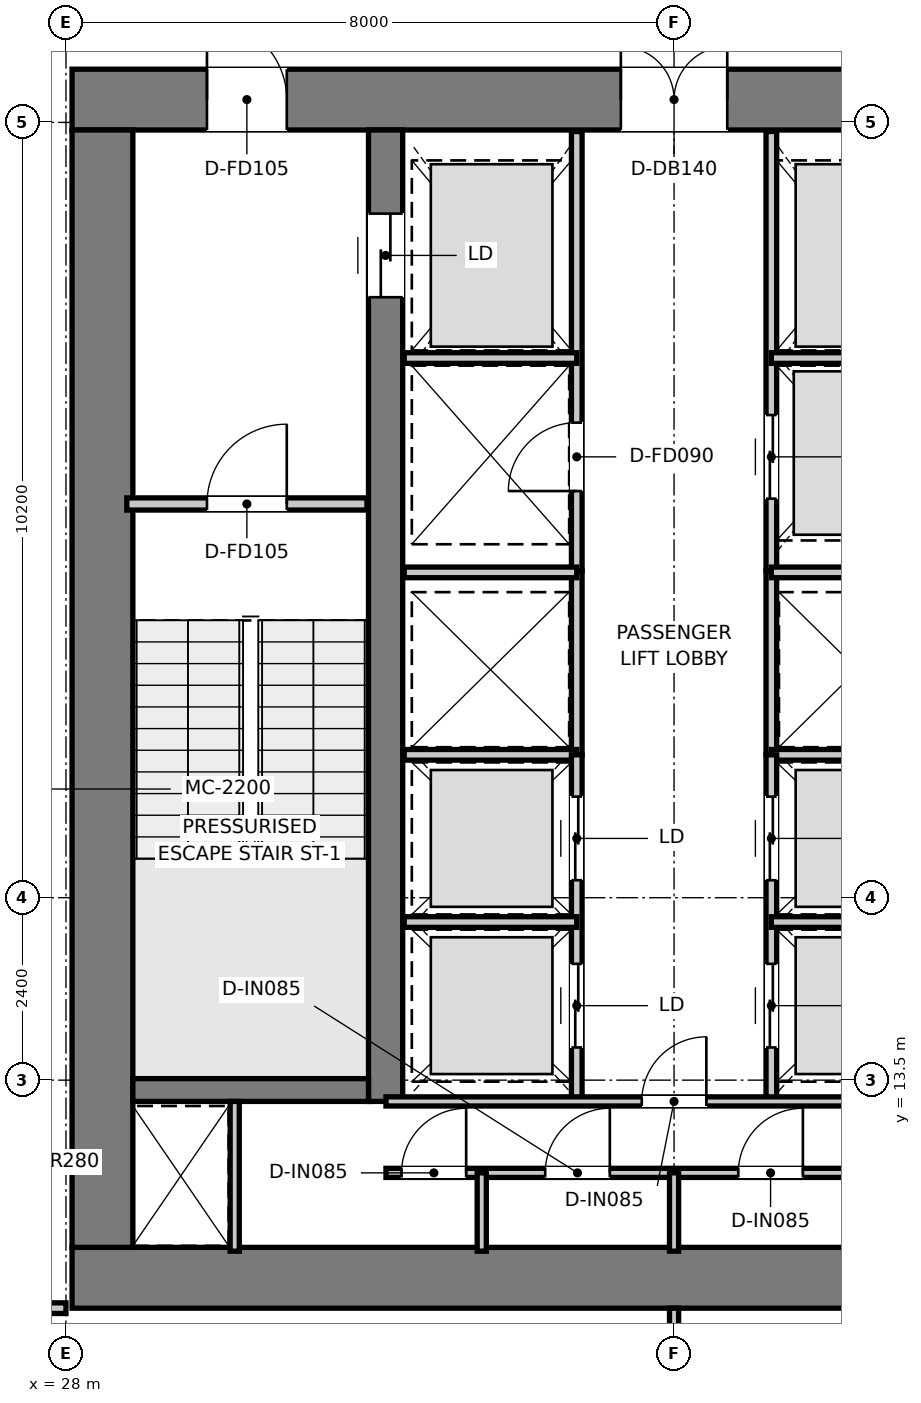
"""IFC4 building model, lengths in metres.
Left out: names, types, materials, properties, quantities, classifications, styles, units other than length and angle.
Written with IfcOpenShell. Run it as: python <this file> out.ifc"""

import sys

from ifc_helpers import new_model, si_unit, direction, frame, frame_2d, origin, place, context, subcontext, project, spatial, rectangle, extrude, element, fill, save


model = new_model("IFC4")
c1 = context("Model", 3, precision=1e-05, world=origin(), true_north=direction((0.0, 1.0)))
c2 = subcontext(c1, "Body", "Model", "MODEL_VIEW")
j1 = project(units=[si_unit("LENGTHUNIT", "METRE"), si_unit("PLANEANGLEUNIT", "RADIAN")], contexts=[c1])
p1 = place(None, origin())
s1 = spatial("IfcSite", under=j1, at=p1, CompositionType="ELEMENT")
p2 = place(p1, origin())
s2 = spatial("IfcBuilding", under=s1, at=p2, CompositionType="ELEMENT")
p3 = place(p2, frame((0.0, 0.0, 28.95)))
s3 = spatial("IfcBuildingStorey", under=s2, at=p3, CompositionType="ELEMENT", Elevation=28.95)
p4 = place(p3, frame((28.08, 10.9, 0.0), z_axis=(0.0, 0.0, 1.0), x_axis=(1.0, 0.0, 0.0)))
e1 = element("IfcWall", 1, at=p4, inside=s3, PredefinedType="SHEAR", context=c2, shape_type="SweptSolid", body=[
    extrude(rectangle(XDim=15.84, YDim=0.8, at=frame_2d((7.92, 0.0))), origin(), (0.0, 0.0, 1.0), 3.95),
])
p5 = place(p3, frame((28.08, 26.4, 0.0), z_axis=(0.0, 0.0, 1.0), x_axis=(1.0, 0.0, 0.0)))
e2 = element("IfcWall", 2, at=p5, inside=s3, PredefinedType="SHEAR", context=c2, shape_type="SweptSolid", body=[
    extrude(rectangle(XDim=15.84, YDim=0.8, at=frame_2d((7.92, 0.0))), origin(), (0.0, 0.0, 1.0), 3.95),
])
p6 = place(p5, frame((7.22, 0.0, 0.0)))
e3 = element("IfcOpeningElement", 3, at=p6, cuts=e2, PredefinedType="OPENING", context=c2, shape_type="SweptSolid", body=[
    extrude(rectangle(XDim=1.4, YDim=2.2, at=frame_2d((0.7, 1.1))), frame((0.0, 0.41, 0.0), z_axis=(0.0, -1.0, 0.0), x_axis=(1.0, 0.0, 0.0)), (0.0, 0.0, 1.0), 0.82),
])
p7 = place(p5, frame((1.775, 0.0, 0.0)))
e4 = element("IfcOpeningElement", 4, at=p7, cuts=e2, PredefinedType="OPENING", context=c2, shape_type="SweptSolid", body=[
    extrude(rectangle(XDim=1.05, YDim=2.1, at=frame_2d((0.525, 1.05))), frame((0.0, 0.41, 0.0), z_axis=(0.0, -1.0, 0.0), x_axis=(1.0, 0.0, 0.0)), (0.0, 0.0, 1.0), 0.82),
])
p8 = place(p5, frame((13.015, 0.0, 0.0)))
e5 = element("IfcOpeningElement", 5, at=p8, cuts=e2, PredefinedType="OPENING", context=c2, shape_type="SweptSolid", body=[
    extrude(rectangle(XDim=1.05, YDim=2.1, at=frame_2d((0.525, 1.05))), frame((0.0, 0.41, 0.0), z_axis=(0.0, -1.0, 0.0), x_axis=(1.0, 0.0, 0.0)), (0.0, 0.0, 1.0), 0.82),
])
p9 = place(p3, frame((28.48, 11.3, 0.0), z_axis=(0.0, 0.0, 1.0), x_axis=(0.0, 1.0, 0.0)))
e6 = element("IfcWall", 6, at=p9, inside=s3, PredefinedType="SHEAR", context=c2, shape_type="SweptSolid", body=[
    extrude(rectangle(XDim=14.7, YDim=0.8, at=frame_2d((7.35, 0.0))), origin(), (0.0, 0.0, 1.0), 3.95),
])
p10 = place(p3, frame((32.205, 13.22, 0.0), z_axis=(0.0, 0.0, 1.0), x_axis=(0.0, 1.0, 0.0)))
e7 = element("IfcWall", 7, at=p10, inside=s3, PredefinedType="SHEAR", context=c2, shape_type="SweptSolid", body=[
    extrude(rectangle(XDim=12.78, YDim=0.45, at=frame_2d((6.39, 0.0))), origin(), (0.0, 0.0, 1.0), 3.95),
])
p11 = place(p10, frame((10.58, 0.0, 0.0)))
e8 = element("IfcOpeningElement", 8, at=p11, cuts=e7, PredefinedType="OPENING", context=c2, shape_type="SweptSolid", body=[
    extrude(rectangle(XDim=1.1, YDim=2.15, at=frame_2d((0.55, 1.075))), frame((0.0, 0.235, 0.0), z_axis=(0.0, -1.0, 0.0), x_axis=(1.0, 0.0, 0.0)), (0.0, 0.0, 1.0), 0.47),
])
p12 = place(p3, frame((28.88, 13.37, 0.0), z_axis=(0.0, 0.0, 1.0), x_axis=(1.0, 0.0, 0.0)))
e9 = element("IfcWall", 9, at=p12, inside=s3, PredefinedType="SHEAR", context=c2, shape_type="SweptSolid", body=[
    extrude(rectangle(XDim=3.1, YDim=0.3, at=frame_2d((1.55, 0.0))), origin(), (0.0, 0.0, 1.0), 3.95),
])
p13 = place(p3, frame((28.8, 21.08, 0.0), z_axis=(0.0, 0.0, 1.0), x_axis=(1.0, 0.0, 0.0)))
e10 = element("IfcWall", 10, at=p13, inside=s3, PredefinedType="PARTITIONING", context=c2, shape_type="SweptSolid", body=[
    extrude(rectangle(XDim=3.16, YDim=0.16, at=frame_2d((1.58, 0.0))), origin(), (0.0, 0.0, 1.0), 3.67),
])
p14 = place(p13, frame((1.055, 0.0, 0.0)))
e11 = element("IfcOpeningElement", 11, at=p14, cuts=e10, PredefinedType="OPENING", context=c2, shape_type="SweptSolid", body=[
    extrude(rectangle(XDim=1.05, YDim=2.1, at=frame_2d((0.525, 1.05))), frame((0.0, 0.09, 0.0), z_axis=(0.0, -1.0, 0.0), x_axis=(1.0, 0.0, 0.0)), (0.0, 0.0, 1.0), 0.18),
])
p15 = place(p3, frame((34.72, 20.2, 0.0), z_axis=(0.0, 0.0, 1.0), x_axis=(0.0, 1.0, 0.0)))
e12 = element("IfcWall", 12, at=p15, inside=s3, PredefinedType="PARTITIONING", context=c2, shape_type="SweptSolid", body=[
    extrude(rectangle(XDim=5.78, YDim=0.14, at=frame_2d((2.89, 0.0))), origin(), (0.0, 0.0, 1.0), 2.47),
])
p16 = place(p15, frame((1.05, 0.0, 0.0)))
e13 = element("IfcOpeningElement", 13, at=p16, cuts=e12, PredefinedType="OPENING", context=c2, shape_type="SweptSolid", body=[
    extrude(rectangle(XDim=0.9, YDim=2.1, at=frame_2d((0.45, 1.05))), frame((0.0, 0.08, 0.0), z_axis=(0.0, -1.0, 0.0), x_axis=(1.0, 0.0, 0.0)), (0.0, 0.0, 1.0), 0.16),
])
p17 = place(p3, frame((37.28, 20.2, 0.0), z_axis=(0.0, 0.0, 1.0), x_axis=(0.0, 1.0, 0.0)))
e14 = element("IfcWall", 14, at=p17, inside=s3, PredefinedType="PARTITIONING", context=c2, shape_type="SweptSolid", body=[
    extrude(rectangle(XDim=5.78, YDim=0.14, at=frame_2d((2.89, 0.0))), origin(), (0.0, 0.0, 1.0), 2.47),
])
p18 = place(p17, frame((0.95, 0.0, 0.0)))
e15 = element("IfcOpeningElement", 15, at=p18, cuts=e14, PredefinedType="OPENING", context=c2, shape_type="SweptSolid", body=[
    extrude(rectangle(XDim=1.1, YDim=2.15, at=frame_2d((0.55, 1.075))), frame((0.0, 0.08, 0.0), z_axis=(0.0, -1.0, 0.0), x_axis=(1.0, 0.0, 0.0)), (0.0, 0.0, 1.0), 0.16),
])
for number, where, z_axis, x_axis in (
    (16, (32.45, 23.0, 0.0), (0.0, 0.0, 1.0), (1.0, 0.0, 0.0)),
    (17, (37.28, 23.0, 0.0), (0.0, 0.0, 1.0), (1.0, 0.0, 0.0)),
):
    element("IfcWall", number, at=place(p3, frame(where, z_axis=z_axis, x_axis=x_axis)), inside=s3, PredefinedType="PARTITIONING", context=c2, shape_type="SweptSolid", body=[
        extrude(rectangle(XDim=2.27, YDim=0.14, at=frame_2d((1.135, 0.0))), origin(), (0.0, 0.0, 1.0), 2.47),
    ])
for number, where, z_axis, x_axis in (
    (18, (34.72, 17.78, 0.0), (0.0, 0.0, 1.0), (0.0, 1.0, 0.0)),
    (19, (37.28, 17.78, 0.0), (0.0, 0.0, 1.0), (0.0, 1.0, 0.0)),
):
    element("IfcWall", number, at=place(p3, frame(where, z_axis=z_axis, x_axis=x_axis)), inside=s3, PredefinedType="PARTITIONING", context=c2, shape_type="SweptSolid", body=[
        extrude(rectangle(XDim=2.42, YDim=0.14, at=frame_2d((1.21, 0.0))), origin(), (0.0, 0.0, 1.0), 3.67),
    ])
for number, where, z_axis, x_axis in (
    (20, (32.45, 17.78, 0.0), (0.0, 0.0, 1.0), (1.0, 0.0, 0.0)),
    (21, (32.45, 20.18, 0.0), (0.0, 0.0, 1.0), (1.0, 0.0, 0.0)),
    (22, (37.28, 17.78, 0.0), (0.0, 0.0, 1.0), (1.0, 0.0, 0.0)),
    (23, (37.28, 20.18, 0.0), (0.0, 0.0, 1.0), (1.0, 0.0, 0.0)),
):
    element("IfcWall", number, at=place(p3, frame(where, z_axis=z_axis, x_axis=x_axis)), inside=s3, PredefinedType="PARTITIONING", context=c2, shape_type="SweptSolid", body=[
        extrude(rectangle(XDim=2.27, YDim=0.14, at=frame_2d((1.135, 0.0))), origin(), (0.0, 0.0, 1.0), 3.67),
    ])
p19 = place(p3, frame((34.72, 13.22, 0.0), z_axis=(0.0, 0.0, 1.0), x_axis=(0.0, 1.0, 0.0)))
e24 = element("IfcWall", 24, at=p19, inside=s3, PredefinedType="PARTITIONING", context=c2, shape_type="SweptSolid", body=[
    extrude(rectangle(XDim=4.56, YDim=0.14, at=frame_2d((2.28, 0.0))), origin(), (0.0, 0.0, 1.0), 3.67),
])
p20 = place(p19, frame((0.71, 0.0, 0.0)))
e25 = element("IfcOpeningElement", 25, at=p20, cuts=e24, PredefinedType="OPENING", context=c2, shape_type="SweptSolid", body=[
    extrude(rectangle(XDim=1.1, YDim=2.15, at=frame_2d((0.55, 1.075))), frame((0.0, 0.08, 0.0), z_axis=(0.0, -1.0, 0.0), x_axis=(1.0, 0.0, 0.0)), (0.0, 0.0, 1.0), 0.16),
])
p21 = place(p19, frame((2.91, 0.0, 0.0)))
e26 = element("IfcOpeningElement", 26, at=p21, cuts=e24, PredefinedType="OPENING", context=c2, shape_type="SweptSolid", body=[
    extrude(rectangle(XDim=1.1, YDim=2.15, at=frame_2d((0.55, 1.075))), frame((0.0, 0.08, 0.0), z_axis=(0.0, -1.0, 0.0), x_axis=(1.0, 0.0, 0.0)), (0.0, 0.0, 1.0), 0.16),
])
p22 = place(p3, frame((32.45, 15.58, 0.0), z_axis=(0.0, 0.0, 1.0), x_axis=(1.0, 0.0, 0.0)))
e27 = element("IfcWall", 27, at=p22, inside=s3, PredefinedType="PARTITIONING", context=c2, shape_type="SweptSolid", body=[
    extrude(rectangle(XDim=2.27, YDim=0.14, at=frame_2d((1.135, 0.0))), origin(), (0.0, 0.0, 1.0), 3.67),
])
p23 = place(p3, frame((37.28, 13.22, 0.0), z_axis=(0.0, 0.0, 1.0), x_axis=(0.0, 1.0, 0.0)))
e28 = element("IfcWall", 28, at=p23, inside=s3, PredefinedType="PARTITIONING", context=c2, shape_type="SweptSolid", body=[
    extrude(rectangle(XDim=4.56, YDim=0.14, at=frame_2d((2.28, 0.0))), origin(), (0.0, 0.0, 1.0), 3.67),
])
p24 = place(p23, frame((0.71, 0.0, 0.0)))
e29 = element("IfcOpeningElement", 29, at=p24, cuts=e28, PredefinedType="OPENING", context=c2, shape_type="SweptSolid", body=[
    extrude(rectangle(XDim=1.1, YDim=2.15, at=frame_2d((0.55, 1.075))), frame((0.0, 0.08, 0.0), z_axis=(0.0, -1.0, 0.0), x_axis=(1.0, 0.0, 0.0)), (0.0, 0.0, 1.0), 0.16),
])
p25 = place(p23, frame((2.91, 0.0, 0.0)))
e30 = element("IfcOpeningElement", 30, at=p25, cuts=e28, PredefinedType="OPENING", context=c2, shape_type="SweptSolid", body=[
    extrude(rectangle(XDim=1.1, YDim=2.15, at=frame_2d((0.55, 1.075))), frame((0.0, 0.08, 0.0), z_axis=(0.0, -1.0, 0.0), x_axis=(1.0, 0.0, 0.0)), (0.0, 0.0, 1.0), 0.16),
])
p26 = place(p3, frame((37.28, 15.58, 0.0), z_axis=(0.0, 0.0, 1.0), x_axis=(1.0, 0.0, 0.0)))
e31 = element("IfcWall", 31, at=p26, inside=s3, PredefinedType="PARTITIONING", context=c2, shape_type="SweptSolid", body=[
    extrude(rectangle(XDim=2.27, YDim=0.14, at=frame_2d((1.135, 0.0))), origin(), (0.0, 0.0, 1.0), 3.67),
])
p27 = place(p3, frame((30.22, 11.25, 0.0), z_axis=(0.0, 0.0, 1.0), x_axis=(0.0, 1.0, 0.0)))
e32 = element("IfcWall", 32, at=p27, inside=s3, PredefinedType="PARTITIONING", context=c2, shape_type="SweptSolid", body=[
    extrude(rectangle(XDim=1.97, YDim=0.12, at=frame_2d((0.985, 0.0))), origin(), (0.0, 0.0, 1.0), 3.67),
])
p28 = place(p3, frame((32.21, 13.22, 0.0), z_axis=(0.0, 0.0, 1.0), x_axis=(1.0, 0.0, 0.0)))
e33 = element("IfcWall", 33, at=p28, inside=s3, PredefinedType="PARTITIONING", context=c2, shape_type="SweptSolid", body=[
    extrude(rectangle(XDim=7.58, YDim=0.12, at=frame_2d((3.79, 0.0))), origin(), (0.0, 0.0, 1.0), 3.67),
])
p29 = place(p28, frame((3.365, 0.0, 0.0)))
e34 = element("IfcOpeningElement", 34, at=p29, cuts=e33, PredefinedType="OPENING", context=c2, shape_type="SweptSolid", body=[
    extrude(rectangle(XDim=0.85, YDim=2.1, at=frame_2d((0.425, 1.05))), frame((0.0, 0.07, 0.0), z_axis=(0.0, -1.0, 0.0), x_axis=(1.0, 0.0, 0.0)), (0.0, 0.0, 1.0), 0.14),
])
p30 = place(p3, frame((32.21, 12.28, 0.0), z_axis=(0.0, 0.0, 1.0), x_axis=(1.0, 0.0, 0.0)))
e35 = element("IfcWall", 35, at=p30, inside=s3, PredefinedType="PARTITIONING", context=c2, shape_type="SweptSolid", body=[
    extrude(rectangle(XDim=7.58, YDim=0.12, at=frame_2d((3.79, 0.0))), origin(), (0.0, 0.0, 1.0), 3.67),
])
p31 = place(p30, frame((0.205, 0.0, 0.0)))
e36 = element("IfcOpeningElement", 36, at=p31, cuts=e35, PredefinedType="OPENING", context=c2, shape_type="SweptSolid", body=[
    extrude(rectangle(XDim=0.85, YDim=2.1, at=frame_2d((0.425, 1.05))), frame((0.0, 0.07, 0.0), z_axis=(0.0, -1.0, 0.0), x_axis=(1.0, 0.0, 0.0)), (0.0, 0.0, 1.0), 0.14),
])
p32 = place(p30, frame((2.095, 0.0, 0.0)))
e37 = element("IfcOpeningElement", 37, at=p32, cuts=e35, PredefinedType="OPENING", context=c2, shape_type="SweptSolid", body=[
    extrude(rectangle(XDim=0.85, YDim=2.1, at=frame_2d((0.425, 1.05))), frame((0.0, 0.07, 0.0), z_axis=(0.0, -1.0, 0.0), x_axis=(1.0, 0.0, 0.0)), (0.0, 0.0, 1.0), 0.14),
])
p33 = place(p30, frame((4.635, 0.0, 0.0)))
e38 = element("IfcOpeningElement", 38, at=p33, cuts=e35, PredefinedType="OPENING", context=c2, shape_type="SweptSolid", body=[
    extrude(rectangle(XDim=0.85, YDim=2.1, at=frame_2d((0.425, 1.05))), frame((0.0, 0.07, 0.0), z_axis=(0.0, -1.0, 0.0), x_axis=(1.0, 0.0, 0.0)), (0.0, 0.0, 1.0), 0.14),
])
p34 = place(p30, frame((6.525, 0.0, 0.0)))
e39 = element("IfcOpeningElement", 39, at=p34, cuts=e35, PredefinedType="OPENING", context=c2, shape_type="SweptSolid", body=[
    extrude(rectangle(XDim=0.85, YDim=2.1, at=frame_2d((0.425, 1.05))), frame((0.0, 0.07, 0.0), z_axis=(0.0, -1.0, 0.0), x_axis=(1.0, 0.0, 0.0)), (0.0, 0.0, 1.0), 0.14),
])
for number, where, z_axis, x_axis in (
    (40, (33.47, 11.25, 0.0), (0.0, 0.0, 1.0), (0.0, 1.0, 0.0)),
    (41, (36.0, 11.25, 0.0), (0.0, 0.0, 1.0), (0.0, 1.0, 0.0)),
):
    element("IfcWall", number, at=place(p3, frame(where, z_axis=z_axis, x_axis=x_axis)), inside=s3, PredefinedType="PARTITIONING", context=c2, shape_type="SweptSolid", body=[
        extrude(rectangle(XDim=1.03, YDim=0.12, at=frame_2d((0.515, 0.0))), origin(), (0.0, 0.0, 1.0), 3.67),
    ])
p35 = place(p3, frame((26.32, 10.5, 0.0), z_axis=(0.0, 0.0, 1.0), x_axis=(1.0, 0.0, 0.0)))
e42 = element("IfcWall", 42, at=p35, inside=s3, PredefinedType="PARTITIONING", context=c2, shape_type="SweptSolid", body=[
    extrude(rectangle(XDim=1.68, YDim=0.14, at=frame_2d((0.84, 0.0))), origin(), (0.0, 0.0, 1.0), 3.67),
])
p36 = place(p35, frame((0.445, 0.0, 0.0)))
e43 = element("IfcOpeningElement", 43, at=p36, cuts=e42, PredefinedType="OPENING", context=c2, shape_type="SweptSolid", body=[
    extrude(rectangle(XDim=0.85, YDim=2.1, at=frame_2d((0.425, 1.05))), frame((0.0, 0.08, 0.0), z_axis=(0.0, -1.0, 0.0), x_axis=(1.0, 0.0, 0.0)), (0.0, 0.0, 1.0), 0.16),
])
p37 = place(p3, frame((36.0, 1.79, 0.0), z_axis=(0.0, 0.0, 1.0), x_axis=(0.0, 1.0, 0.0)))
e44 = element("IfcWall", 44, at=p37, inside=s3, PredefinedType="PARTITIONING", context=c2, shape_type="SweptSolid", body=[
    extrude(rectangle(XDim=8.71, YDim=0.12, at=frame_2d((4.355, 0.0))), origin(), (0.0, 0.0, 1.0), 3.67),
])
p38 = place(p14, origin())
e45 = element("IfcDoor", 45, at=p38, inside=s3, OperationType="SINGLE_SWING_RIGHT", PredefinedType="DOOR", context=c2, shape_type="SweptSolid", body=[
    extrude(rectangle(XDim=1.05, YDim=2.1, at=frame_2d((0.525, 1.05))), frame((0.0, 0.025, 0.0), z_axis=(0.0, -1.0, 0.0), x_axis=(1.0, 0.0, 0.0)), (0.0, 0.0, 1.0), 0.05),
])
fill(e11, e45)
p39 = place(p6, origin())
e46 = element("IfcDoor", 46, at=p39, inside=s3, OperationType="DOUBLE_DOOR_SINGLE_SWING", PredefinedType="DOOR", context=c2, shape_type="SweptSolid", body=[
    extrude(rectangle(XDim=1.4, YDim=2.2, at=frame_2d((0.7, 1.1))), frame((0.0, 0.025, 0.0), z_axis=(0.0, -1.0, 0.0), x_axis=(1.0, 0.0, 0.0)), (0.0, 0.0, 1.0), 0.05),
])
fill(e3, e46)
p40 = place(p7, origin())
e47 = element("IfcDoor", 47, at=p40, inside=s3, OperationType="SINGLE_SWING_LEFT", PredefinedType="DOOR", context=c2, shape_type="SweptSolid", body=[
    extrude(rectangle(XDim=1.05, YDim=2.1, at=frame_2d((0.525, 1.05))), frame((0.0, 0.025, 0.0), z_axis=(0.0, -1.0, 0.0), x_axis=(1.0, 0.0, 0.0)), (0.0, 0.0, 1.0), 0.05),
])
fill(e4, e47)
p41 = place(p11, origin())
e48 = element("IfcDoor", 48, at=p41, inside=s3, OperationType="DOUBLE_DOOR_SLIDING", PredefinedType="DOOR", context=c2, shape_type="SweptSolid", body=[
    extrude(rectangle(XDim=1.1, YDim=2.15, at=frame_2d((0.55, 1.075))), frame((0.0, 0.025, 0.0), z_axis=(0.0, -1.0, 0.0), x_axis=(1.0, 0.0, 0.0)), (0.0, 0.0, 1.0), 0.05),
])
fill(e8, e48)
p42 = place(p16, origin())
e49 = element("IfcDoor", 49, at=p42, inside=s3, OperationType="SINGLE_SWING_LEFT", PredefinedType="DOOR", context=c2, shape_type="SweptSolid", body=[
    extrude(rectangle(XDim=0.9, YDim=2.1, at=frame_2d((0.45, 1.05))), frame((0.0, 0.025, 0.0), z_axis=(0.0, -1.0, 0.0), x_axis=(1.0, 0.0, 0.0)), (0.0, 0.0, 1.0), 0.05),
])
fill(e13, e49)
p43 = place(p18, origin())
e50 = element("IfcDoor", 50, at=p43, inside=s3, OperationType="DOUBLE_DOOR_SLIDING", PredefinedType="DOOR", context=c2, shape_type="SweptSolid", body=[
    extrude(rectangle(XDim=1.1, YDim=2.15, at=frame_2d((0.55, 1.075))), frame((0.0, 0.025, 0.0), z_axis=(0.0, -1.0, 0.0), x_axis=(1.0, 0.0, 0.0)), (0.0, 0.0, 1.0), 0.05),
])
fill(e15, e50)
p44 = place(p20, origin())
e51 = element("IfcDoor", 51, at=p44, inside=s3, OperationType="DOUBLE_DOOR_SLIDING", PredefinedType="DOOR", context=c2, shape_type="SweptSolid", body=[
    extrude(rectangle(XDim=1.1, YDim=2.15, at=frame_2d((0.55, 1.075))), frame((0.0, 0.025, 0.0), z_axis=(0.0, -1.0, 0.0), x_axis=(1.0, 0.0, 0.0)), (0.0, 0.0, 1.0), 0.05),
])
fill(e25, e51)
p45 = place(p21, origin())
e52 = element("IfcDoor", 52, at=p45, inside=s3, OperationType="DOUBLE_DOOR_SLIDING", PredefinedType="DOOR", context=c2, shape_type="SweptSolid", body=[
    extrude(rectangle(XDim=1.1, YDim=2.15, at=frame_2d((0.55, 1.075))), frame((0.0, 0.025, 0.0), z_axis=(0.0, -1.0, 0.0), x_axis=(1.0, 0.0, 0.0)), (0.0, 0.0, 1.0), 0.05),
])
fill(e26, e52)
p46 = place(p24, origin())
e53 = element("IfcDoor", 53, at=p46, inside=s3, OperationType="DOUBLE_DOOR_SLIDING", PredefinedType="DOOR", context=c2, shape_type="SweptSolid", body=[
    extrude(rectangle(XDim=1.1, YDim=2.15, at=frame_2d((0.55, 1.075))), frame((0.0, 0.025, 0.0), z_axis=(0.0, -1.0, 0.0), x_axis=(1.0, 0.0, 0.0)), (0.0, 0.0, 1.0), 0.05),
])
fill(e29, e53)
p47 = place(p25, origin())
e54 = element("IfcDoor", 54, at=p47, inside=s3, OperationType="DOUBLE_DOOR_SLIDING", PredefinedType="DOOR", context=c2, shape_type="SweptSolid", body=[
    extrude(rectangle(XDim=1.1, YDim=2.15, at=frame_2d((0.55, 1.075))), frame((0.0, 0.025, 0.0), z_axis=(0.0, -1.0, 0.0), x_axis=(1.0, 0.0, 0.0)), (0.0, 0.0, 1.0), 0.05),
])
fill(e30, e54)
p48 = place(p29, origin())
e55 = element("IfcDoor", 55, at=p48, inside=s3, OperationType="SINGLE_SWING_RIGHT", PredefinedType="DOOR", context=c2, shape_type="SweptSolid", body=[
    extrude(rectangle(XDim=0.85, YDim=2.1, at=frame_2d((0.425, 1.05))), frame((0.0, 0.025, 0.0), z_axis=(0.0, -1.0, 0.0), x_axis=(1.0, 0.0, 0.0)), (0.0, 0.0, 1.0), 0.05),
])
fill(e34, e55)
p49 = place(p31, origin())
e56 = element("IfcDoor", 56, at=p49, inside=s3, OperationType="SINGLE_SWING_RIGHT", PredefinedType="DOOR", context=c2, shape_type="SweptSolid", body=[
    extrude(rectangle(XDim=0.85, YDim=2.1, at=frame_2d((0.425, 1.05))), frame((0.0, 0.025, 0.0), z_axis=(0.0, -1.0, 0.0), x_axis=(1.0, 0.0, 0.0)), (0.0, 0.0, 1.0), 0.05),
])
fill(e36, e56)
p50 = place(p32, origin())
e57 = element("IfcDoor", 57, at=p50, inside=s3, OperationType="SINGLE_SWING_RIGHT", PredefinedType="DOOR", context=c2, shape_type="SweptSolid", body=[
    extrude(rectangle(XDim=0.85, YDim=2.1, at=frame_2d((0.425, 1.05))), frame((0.0, 0.025, 0.0), z_axis=(0.0, -1.0, 0.0), x_axis=(1.0, 0.0, 0.0)), (0.0, 0.0, 1.0), 0.05),
])
fill(e37, e57)
p51 = place(p33, origin())
e58 = element("IfcDoor", 58, at=p51, inside=s3, OperationType="SINGLE_SWING_RIGHT", PredefinedType="DOOR", context=c2, shape_type="SweptSolid", body=[
    extrude(rectangle(XDim=0.85, YDim=2.1, at=frame_2d((0.425, 1.05))), frame((0.0, 0.025, 0.0), z_axis=(0.0, -1.0, 0.0), x_axis=(1.0, 0.0, 0.0)), (0.0, 0.0, 1.0), 0.05),
])
fill(e38, e58)
save(model, sys.argv[1])
